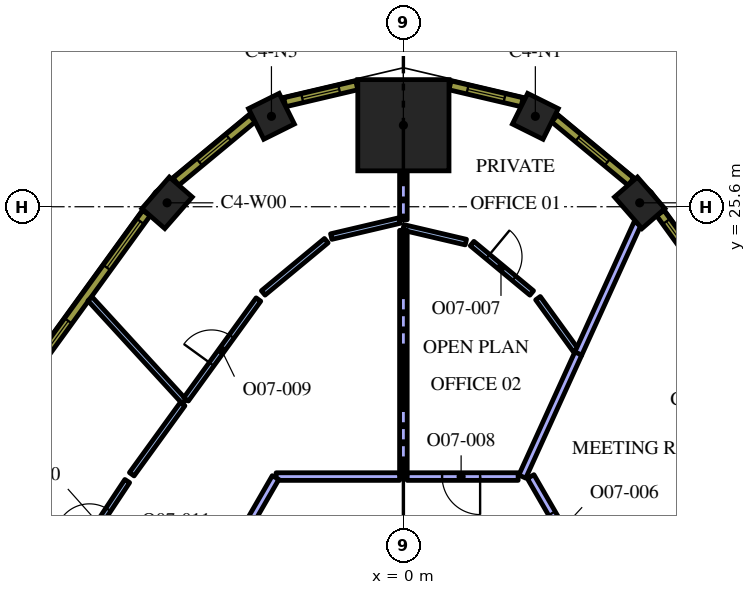
"""IFC4 building model, lengths in metres.
Left out: names, types, materials, properties, quantities, classifications, styles, units other than length and angle.
Written with IfcOpenShell. Run it as: python <this file> out.ifc"""

import sys

from ifc_helpers import new_model, si_unit, direction, frame, frame_2d, origin, origin_2d, place, context, subcontext, project, spatial, rectangle, extrude, element, fill, save


model = new_model("IFC4")
c1 = context("Model", 3, precision=1e-05, world=origin(), true_north=direction((0.0, 1.0)))
c2 = subcontext(c1, "Body", "Model", "MODEL_VIEW")
j1 = project(units=[si_unit("LENGTHUNIT", "METRE"), si_unit("PLANEANGLEUNIT", "RADIAN")], contexts=[c1])
p1 = place(None, origin())
s1 = spatial("IfcSite", under=j1, at=p1, CompositionType="ELEMENT")
p2 = place(p1, origin())
s2 = spatial("IfcBuilding", under=s1, at=p2, CompositionType="ELEMENT")
p3 = place(p2, frame((0.0, 0.0, 222.6)))
s3 = spatial("IfcBuildingStorey", under=s2, at=p3, CompositionType="ELEMENT", Elevation=222.6)
p4 = place(p3, frame((0.0, 27.744, 0.0), z_axis=(0.0, 0.0, 1.0), x_axis=(0.0, 1.0, 0.0)))
e1 = element("IfcColumn", 1, at=p4, inside=s3, PredefinedType="COLUMN", context=c2, shape_type="SweptSolid", body=[
    extrude(rectangle(XDim=2.4, YDim=2.4, at=origin_2d()), origin(), (0.0, 0.0, 1.0), 4.2),
])
p5 = place(p3, frame((6.219, 25.703, 0.0), z_axis=(0.0, 0.0, 1.0), x_axis=(-0.657250291216, 0.753672378886, 0.0)))
e2 = element("IfcColumn", 2, at=p5, inside=s3, PredefinedType="COLUMN", context=c2, shape_type="SweptSolid", body=[
    extrude(rectangle(XDim=1.1, YDim=0.8, at=origin_2d()), origin(), (0.0, 0.0, 1.0), 4.2),
])
for number, where, z_axis, x_axis in (
    (3, (3.472, 27.979, 0.0), (0.0, 0.0, 1.0), (-0.895, 0.445, 0.0)),
    (4, (-3.472, 27.979, 0.0), (0.0, 0.0, 1.0), (-0.895, -0.445, 0.0)),
):
    element("IfcColumn", number, at=place(p3, frame(where, z_axis=z_axis, x_axis=x_axis)), inside=s3, PredefinedType="COLUMN", context=c2, shape_type="SweptSolid", body=[
        extrude(rectangle(XDim=0.9, YDim=0.9, at=origin_2d()), origin(), (0.0, 0.0, 1.0), 4.2),
    ])
p6 = place(p3, frame((-6.219, 25.703, 0.0), z_axis=(0.0, 0.0, 1.0), x_axis=(-0.657250291216, -0.753672378886, 0.0)))
e5 = element("IfcColumn", 5, at=p6, inside=s3, PredefinedType="COLUMN", context=c2, shape_type="SweptSolid", body=[
    extrude(rectangle(XDim=1.1, YDim=0.8, at=origin_2d()), origin(), (0.0, 0.0, 1.0), 4.2),
])
p7 = place(p3, frame((7.011, 15.156, 0.0), z_axis=(0.0, 0.0, 1.0), x_axis=(0.866015917575, 0.500016430238, 0.0)))
e6 = element("IfcWall", 6, at=p7, inside=s3, PredefinedType="PARTITIONING", context=c2, shape_type="SweptSolid", body=[
    extrude(rectangle(XDim=5.607, YDim=0.2, at=frame_2d((2.804, 0.0))), origin(), (0.0, 0.0, 1.0), 3.45),
])
p8 = place(p3, frame((4.599, 21.729, 0.0), z_axis=(0.0, 0.0, 1.0), x_axis=(0.414300595715, 0.91014010811, 0.0)))
e7 = element("IfcWall", 7, at=p8, inside=s3, PredefinedType="PARTITIONING", context=c2, shape_type="SweptSolid", body=[
    extrude(rectangle(XDim=3.77, YDim=0.2, at=frame_2d((1.885, 0.0))), origin(), (0.0, 0.0, 1.0), 3.45),
])
p9 = place(p3, frame((3.129, 18.5, 0.0), z_axis=(0.0, 0.0, 1.0), x_axis=(0.41435618773, 0.910114800281, 0.0)))
e8 = element("IfcWall", 8, at=p9, inside=s3, PredefinedType="PARTITIONING", context=c2, shape_type="SweptSolid", body=[
    extrude(rectangle(XDim=3.557, YDim=0.2, at=frame_2d((1.779, 0.0))), origin(), (0.0, 0.0, 1.0), 3.45),
])
p10 = place(p3, frame((5.007, 15.627, 0.0), z_axis=(0.0, 0.0, 1.0), x_axis=(-0.499962429619, 0.866047093968, 0.0)))
e9 = element("IfcWall", 9, at=p10, inside=s3, PredefinedType="PARTITIONING", context=c2, shape_type="SweptSolid", body=[
    extrude(rectangle(XDim=3.317, YDim=0.2, at=frame_2d((1.659, 0.0))), origin(), (0.0, 0.0, 1.0), 3.45),
])
p11 = place(p10, frame((1.2, 0.0, 0.0)))
e10 = element("IfcOpeningElement", 10, at=p11, cuts=e9, PredefinedType="OPENING", context=c2, shape_type="SweptSolid", body=[
    extrude(rectangle(XDim=1.0, YDim=2.1, at=frame_2d((0.5, 1.05))), frame((0.0, 0.11, 0.0), z_axis=(0.0, -1.0, 0.0), x_axis=(1.0, 0.0, 0.0)), (0.0, 0.0, 1.0), 0.22),
])
p12 = place(p3, frame((4.533, 21.826, 0.0), z_axis=(0.0, 0.0, 1.0), x_axis=(-0.587019669034, 0.809572670096, 0.0)))
e11 = element("IfcWall", 11, at=p12, inside=s3, PredefinedType="PARTITIONING", context=c2, shape_type="SweptSolid", body=[
    extrude(rectangle(XDim=1.689, YDim=0.15, at=frame_2d((0.845, 0.0))), origin(), (0.0, 0.0, 1.0), 3.45),
])
p13 = place(p3, frame((1.808, 24.631, 0.0), z_axis=(0.0, 0.0, 1.0), x_axis=(0.769986239032, -0.638060492195, 0.0)))
e12 = element("IfcWall", 12, at=p13, inside=s3, PredefinedType="PARTITIONING", context=c2, shape_type="SweptSolid", body=[
    extrude(rectangle(XDim=2.038, YDim=0.15, at=frame_2d((1.019, 0.0))), origin(), (0.0, 0.0, 1.0), 3.45),
])
p14 = place(p13, frame((0.538, 0.0, 0.0)))
e13 = element("IfcOpeningElement", 13, at=p14, cuts=e12, PredefinedType="OPENING", context=c2, shape_type="SweptSolid", body=[
    extrude(rectangle(XDim=0.9, YDim=2.1, at=frame_2d((0.45, 1.05))), frame((0.0, 0.085, 0.0), z_axis=(0.0, -1.0, 0.0), x_axis=(1.0, 0.0, 0.0)), (0.0, 0.0, 1.0), 0.17),
])
p15 = place(p3, frame((1.644, 24.669, 0.0), z_axis=(0.0, 0.0, 1.0), x_axis=(-0.973521361509, 0.228596060084, 0.0)))
e14 = element("IfcWall", 14, at=p15, inside=s3, PredefinedType="PARTITIONING", context=c2, shape_type="SweptSolid", body=[
    extrude(rectangle(XDim=1.688, YDim=0.15, at=frame_2d((0.844, 0.0))), origin(), (0.0, 0.0, 1.0), 3.45),
])
p16 = place(p3, frame((0.0, 25.257, 0.0), z_axis=(0.0, 0.0, 1.0), x_axis=(0.0, 1.0, 0.0)))
e15 = element("IfcWall", 15, at=p16, inside=s3, PredefinedType="PARTITIONING", context=c2, shape_type="SweptSolid", body=[
    extrude(rectangle(XDim=1.288, YDim=0.2, at=frame_2d((0.644, 0.0))), origin(), (0.0, 0.0, 1.0), 3.45),
])
p17 = place(p3, frame((0.0, 18.5, 0.0), z_axis=(0.0, 0.0, 1.0), x_axis=(0.0, 1.0, 0.0)))
e16 = element("IfcWall", 16, at=p17, inside=s3, PredefinedType="PARTITIONING", context=c2, shape_type="SweptSolid", body=[
    extrude(rectangle(XDim=6.479, YDim=0.2, at=frame_2d((3.239, 0.0))), origin(), (0.0, 0.0, 1.0), 3.45),
])
p18 = place(p3, frame((3.019, 18.5, 0.0), z_axis=(0.0, 0.0, 1.0), x_axis=(-1.0, 0.0, 0.0)))
e17 = element("IfcWall", 17, at=p18, inside=s3, PredefinedType="PARTITIONING", context=c2, shape_type="SweptSolid", body=[
    extrude(rectangle(XDim=2.919, YDim=0.2, at=frame_2d((1.459, 0.0))), origin(), (0.0, 0.0, 1.0), 3.45),
])
p19 = place(p18, frame((1.0, 0.0, 0.0)))
e18 = element("IfcOpeningElement", 18, at=p19, cuts=e17, PredefinedType="OPENING", context=c2, shape_type="SweptSolid", body=[
    extrude(rectangle(XDim=1.0, YDim=2.1, at=frame_2d((0.5, 1.05))), frame((0.0, 0.11, 0.0), z_axis=(0.0, -1.0, 0.0), x_axis=(1.0, 0.0, 0.0)), (0.0, 0.0, 1.0), 0.22),
])
p20 = place(p3, frame((-5.764, 20.469, 0.0), z_axis=(0.0, 0.0, 1.0), x_axis=(-0.675673477211, 0.737201025632, 0.0)))
e19 = element("IfcWall", 19, at=p20, inside=s3, PredefinedType="PARTITIONING", context=c2, shape_type="SweptSolid", body=[
    extrude(rectangle(XDim=3.674, YDim=0.15, at=frame_2d((1.837, 0.0))), origin(), (0.0, 0.0, 1.0), 3.45),
])
p21 = place(p3, frame((-0.1, 25.237, 0.0), z_axis=(0.0, 0.0, 1.0), x_axis=(-0.973501996937, -0.22867851224, 0.0)))
e20 = element("IfcWall", 20, at=p21, inside=s3, PredefinedType="PARTITIONING", context=c2, shape_type="SweptSolid", body=[
    extrude(rectangle(XDim=1.848, YDim=0.15, at=frame_2d((0.924, 0.0))), origin(), (0.0, 0.0, 1.0), 3.45),
])
p22 = place(p3, frame((-2.029, 24.707, 0.0), z_axis=(0.0, 0.0, 1.0), x_axis=(-0.769991356208, -0.63805431694, 0.0)))
e21 = element("IfcWall", 21, at=p22, inside=s3, PredefinedType="PARTITIONING", context=c2, shape_type="SweptSolid", body=[
    extrude(rectangle(XDim=2.156, YDim=0.15, at=frame_2d((1.078, 0.0))), origin(), (0.0, 0.0, 1.0), 3.45),
])
p23 = place(p3, frame((-5.719, 20.531, 0.0), z_axis=(0.0, 0.0, 1.0), x_axis=(0.586981132734, 0.809600611298, 0.0)))
e22 = element("IfcWall", 22, at=p23, inside=s3, PredefinedType="PARTITIONING", context=c2, shape_type="SweptSolid", body=[
    extrude(rectangle(XDim=3.245, YDim=0.15, at=frame_2d((1.623, 0.0))), origin(), (0.0, 0.0, 1.0), 3.45),
])
p24 = place(p23, frame((1.145, 0.0, 0.0)))
e23 = element("IfcOpeningElement", 23, at=p24, cuts=e22, PredefinedType="OPENING", context=c2, shape_type="SweptSolid", body=[
    extrude(rectangle(XDim=0.9, YDim=2.1, at=frame_2d((0.45, 1.05))), frame((0.0, 0.085, 0.0), z_axis=(0.0, -1.0, 0.0), x_axis=(1.0, 0.0, 0.0)), (0.0, 0.0, 1.0), 0.17),
])
p25 = place(p3, frame((-5.809, 20.407, 0.0), z_axis=(0.0, 0.0, 1.0), x_axis=(-0.587095604593, -0.809517603927, 0.0)))
e24 = element("IfcWall", 24, at=p25, inside=s3, PredefinedType="PARTITIONING", context=c2, shape_type="SweptSolid", body=[
    extrude(rectangle(XDim=2.281, YDim=0.15, at=frame_2d((1.141, 0.0))), origin(), (0.0, 0.0, 1.0), 3.45),
])
p26 = place(p3, frame((-8.744, 16.156, 0.0), z_axis=(0.0, 0.0, 1.0), x_axis=(0.552885218102, 0.833257424572, 0.0)))
e25 = element("IfcWall", 25, at=p26, inside=s3, PredefinedType="PARTITIONING", context=c2, shape_type="SweptSolid", body=[
    extrude(rectangle(XDim=2.672, YDim=0.15, at=frame_2d((1.336, 0.0))), origin(), (0.0, 0.0, 1.0), 3.45),
])
p27 = place(p26, frame((0.872, 0.0, 0.0)))
e26 = element("IfcOpeningElement", 26, at=p27, cuts=e25, PredefinedType="OPENING", context=c2, shape_type="SweptSolid", body=[
    extrude(rectangle(XDim=0.9, YDim=2.1, at=frame_2d((0.45, 1.05))), frame((0.0, 0.085, 0.0), z_axis=(0.0, -1.0, 0.0), x_axis=(1.0, 0.0, 0.0)), (0.0, 0.0, 1.0), 0.17),
])
p28 = place(p3, frame((-8.809, 16.194, 0.0), z_axis=(0.0, 0.0, 1.0), x_axis=(-0.865996792572, 0.500049552799, 0.0)))
e27 = element("IfcWall", 27, at=p28, inside=s3, PredefinedType="PARTITIONING", context=c2, shape_type="SweptSolid", body=[
    extrude(rectangle(XDim=3.532, YDim=0.15, at=frame_2d((1.766, 0.0))), origin(), (0.0, 0.0, 1.0), 3.45),
])
p29 = place(p3, frame((-0.1, 18.5, 0.0), z_axis=(0.0, 0.0, 1.0), x_axis=(-1.0, 0.0, 0.0)))
e28 = element("IfcWall", 28, at=p29, inside=s3, PredefinedType="PARTITIONING", context=c2, shape_type="SweptSolid", body=[
    extrude(rectangle(XDim=3.249, YDim=0.2, at=frame_2d((1.624, 0.0))), origin(), (0.0, 0.0, 1.0), 3.45),
])
p30 = place(p3, frame((-3.364, 18.474, 0.0), z_axis=(0.0, 0.0, 1.0), x_axis=(-0.500007432598, -0.866021112529, 0.0)))
e29 = element("IfcWall", 29, at=p30, inside=s3, PredefinedType="PARTITIONING", context=c2, shape_type="SweptSolid", body=[
    extrude(rectangle(XDim=4.623, YDim=0.2, at=frame_2d((2.311, 0.0))), origin(), (0.0, 0.0, 1.0), 3.45),
])
p31 = place(p30, frame((1.8, 0.0, 0.0)))
e30 = element("IfcOpeningElement", 30, at=p31, cuts=e29, PredefinedType="OPENING", context=c2, shape_type="SweptSolid", body=[
    extrude(rectangle(XDim=1.0, YDim=2.1, at=frame_2d((0.5, 1.05))), frame((0.0, 0.11, 0.0), z_axis=(0.0, -1.0, 0.0), x_axis=(1.0, 0.0, 0.0)), (0.0, 0.0, 1.0), 0.22),
])
p32 = place(p3, frame((9.878, 21.132, 0.0), z_axis=(0.0, 0.0, 1.0), x_axis=(-0.586998456641, 0.80958805074, 0.0)))
e31 = element("IfcWall", 31, at=p32, inside=s3, PredefinedType="SOLIDWALL", context=c2, shape_type="SweptSolid", body=[
    extrude(rectangle(XDim=5.311, YDim=0.24, at=frame_2d((2.655, 0.0))), origin(), (0.0, 0.0, 1.0), 3.95),
])
p33 = place(p32, frame((0.306, 0.0, 0.9)))
e32 = element("IfcOpeningElement", 32, at=p33, cuts=e31, PredefinedType="OPENING", context=c2, shape_type="SweptSolid", body=[
    extrude(rectangle(XDim=1.5, YDim=2.55, at=frame_2d((0.75, 1.275))), frame((0.0, 0.13, 0.0), z_axis=(0.0, -1.0, 0.0), x_axis=(1.0, 0.0, 0.0)), (0.0, 0.0, 1.0), 0.26),
])
p34 = place(p32, frame((3.539, 0.0, 0.9)))
e33 = element("IfcOpeningElement", 33, at=p34, cuts=e31, PredefinedType="OPENING", context=c2, shape_type="SweptSolid", body=[
    extrude(rectangle(XDim=1.5, YDim=2.55, at=frame_2d((0.75, 1.275))), frame((0.0, 0.13, 0.0), z_axis=(0.0, -1.0, 0.0), x_axis=(1.0, 0.0, 0.0)), (0.0, 0.0, 1.0), 0.26),
])
p35 = place(p3, frame((5.987, 26.259, 0.0), z_axis=(0.0, 0.0, 1.0), x_axis=(-0.769990037733, 0.638055908045, 0.0)))
e34 = element("IfcWall", 34, at=p35, inside=s3, PredefinedType="SOLIDWALL", context=c2, shape_type="SweptSolid", body=[
    extrude(rectangle(XDim=2.609, YDim=0.24, at=frame_2d((1.305, 0.0))), origin(), (0.0, 0.0, 1.0), 3.95),
])
p36 = place(p35, frame((0.805, 0.0, 0.9)))
e35 = element("IfcOpeningElement", 35, at=p36, cuts=e34, PredefinedType="OPENING", context=c2, shape_type="SweptSolid", body=[
    extrude(rectangle(XDim=1.0, YDim=2.55, at=frame_2d((0.5, 1.275))), frame((0.0, 0.13, 0.0), z_axis=(0.0, -1.0, 0.0), x_axis=(1.0, 0.0, 0.0)), (0.0, 0.0, 1.0), 0.26),
])
p37 = place(p3, frame((3.123, 28.349, 0.0), z_axis=(0.0, 0.0, 1.0), x_axis=(-0.973515706272, 0.228620142686, 0.0)))
e36 = element("IfcWall", 36, at=p37, inside=s3, PredefinedType="SOLIDWALL", context=c2, shape_type="SweptSolid", body=[
    extrude(rectangle(XDim=1.948, YDim=0.24, at=frame_2d((0.974, 0.0))), origin(), (0.0, 0.0, 1.0), 3.95),
])
p38 = place(p37, frame((0.474, 0.0, 0.9)))
e37 = element("IfcOpeningElement", 37, at=p38, cuts=e36, PredefinedType="OPENING", context=c2, shape_type="SweptSolid", body=[
    extrude(rectangle(XDim=1.0, YDim=2.55, at=frame_2d((0.5, 1.275))), frame((0.0, 0.13, 0.0), z_axis=(0.0, -1.0, 0.0), x_axis=(1.0, 0.0, 0.0)), (0.0, 0.0, 1.0), 0.26),
])
p39 = place(p3, frame((-1.227, 28.794, 0.0), z_axis=(0.0, 0.0, 1.0), x_axis=(-0.973515706272, -0.228620142686, 0.0)))
e38 = element("IfcWall", 38, at=p39, inside=s3, PredefinedType="SOLIDWALL", context=c2, shape_type="SweptSolid", body=[
    extrude(rectangle(XDim=1.948, YDim=0.24, at=frame_2d((0.974, 0.0))), origin(), (0.0, 0.0, 1.0), 3.95),
])
p40 = place(p39, frame((0.474, 0.0, 0.9)))
e39 = element("IfcOpeningElement", 39, at=p40, cuts=e38, PredefinedType="OPENING", context=c2, shape_type="SweptSolid", body=[
    extrude(rectangle(XDim=1.0, YDim=2.55, at=frame_2d((0.5, 1.275))), frame((0.0, 0.13, 0.0), z_axis=(0.0, -1.0, 0.0), x_axis=(1.0, 0.0, 0.0)), (0.0, 0.0, 1.0), 0.26),
])
p41 = place(p3, frame((-3.978, 27.924, 0.0), z_axis=(0.0, 0.0, 1.0), x_axis=(-0.769990037733, -0.638055908045, 0.0)))
e40 = element("IfcWall", 40, at=p41, inside=s3, PredefinedType="SOLIDWALL", context=c2, shape_type="SweptSolid", body=[
    extrude(rectangle(XDim=2.609, YDim=0.24, at=frame_2d((1.305, 0.0))), origin(), (0.0, 0.0, 1.0), 3.95),
])
p42 = place(p41, frame((0.805, 0.0, 0.9)))
e41 = element("IfcOpeningElement", 41, at=p42, cuts=e40, PredefinedType="OPENING", context=c2, shape_type="SweptSolid", body=[
    extrude(rectangle(XDim=1.0, YDim=2.55, at=frame_2d((0.5, 1.275))), frame((0.0, 0.13, 0.0), z_axis=(0.0, -1.0, 0.0), x_axis=(1.0, 0.0, 0.0)), (0.0, 0.0, 1.0), 0.26),
])
p43 = place(p3, frame((-6.761, 25.432, 0.0), z_axis=(0.0, 0.0, 1.0), x_axis=(-0.586998456641, -0.80958805074, 0.0)))
e42 = element("IfcWall", 42, at=p43, inside=s3, PredefinedType="SOLIDWALL", context=c2, shape_type="SweptSolid", body=[
    extrude(rectangle(XDim=5.311, YDim=0.24, at=frame_2d((2.655, 0.0))), origin(), (0.0, 0.0, 1.0), 3.95),
])
p44 = place(p43, frame((0.271, 0.0, 0.9)))
e43 = element("IfcOpeningElement", 43, at=p44, cuts=e42, PredefinedType="OPENING", context=c2, shape_type="SweptSolid", body=[
    extrude(rectangle(XDim=1.5, YDim=2.55, at=frame_2d((0.75, 1.275))), frame((0.0, 0.13, 0.0), z_axis=(0.0, -1.0, 0.0), x_axis=(1.0, 0.0, 0.0)), (0.0, 0.0, 1.0), 0.26),
])
p45 = place(p43, frame((3.504, 0.0, 0.9)))
e44 = element("IfcOpeningElement", 44, at=p45, cuts=e42, PredefinedType="OPENING", context=c2, shape_type="SweptSolid", body=[
    extrude(rectangle(XDim=1.5, YDim=2.55, at=frame_2d((0.75, 1.275))), frame((0.0, 0.13, 0.0), z_axis=(0.0, -1.0, 0.0), x_axis=(1.0, 0.0, 0.0)), (0.0, 0.0, 1.0), 0.26),
])
p46 = place(p11, origin())
e45 = element("IfcDoor", 45, at=p46, inside=s3, OperationType="SINGLE_SWING_RIGHT", PredefinedType="DOOR", context=c2, shape_type="SweptSolid", body=[
    extrude(rectangle(XDim=1.0, YDim=2.1, at=frame_2d((0.5, 1.05))), frame((0.0, 0.025, 0.0), z_axis=(0.0, -1.0, 0.0), x_axis=(1.0, 0.0, 0.0)), (0.0, 0.0, 1.0), 0.05),
])
fill(e10, e45)
p47 = place(p14, origin())
e46 = element("IfcDoor", 46, at=p47, inside=s3, OperationType="SINGLE_SWING_LEFT", PredefinedType="DOOR", context=c2, shape_type="SweptSolid", body=[
    extrude(rectangle(XDim=0.9, YDim=2.1, at=frame_2d((0.45, 1.05))), frame((0.0, 0.025, 0.0), z_axis=(0.0, -1.0, 0.0), x_axis=(1.0, 0.0, 0.0)), (0.0, 0.0, 1.0), 0.05),
])
fill(e13, e46)
p48 = place(p19, origin())
e47 = element("IfcDoor", 47, at=p48, inside=s3, OperationType="SINGLE_SWING_RIGHT", PredefinedType="DOOR", context=c2, shape_type="SweptSolid", body=[
    extrude(rectangle(XDim=1.0, YDim=2.1, at=frame_2d((0.5, 1.05))), frame((0.0, 0.025, 0.0), z_axis=(0.0, -1.0, 0.0), x_axis=(1.0, 0.0, 0.0)), (0.0, 0.0, 1.0), 0.05),
])
fill(e18, e47)
p49 = place(p24, origin())
e48 = element("IfcDoor", 48, at=p49, inside=s3, OperationType="SINGLE_SWING_LEFT", PredefinedType="DOOR", context=c2, shape_type="SweptSolid", body=[
    extrude(rectangle(XDim=0.9, YDim=2.1, at=frame_2d((0.45, 1.05))), frame((0.0, 0.025, 0.0), z_axis=(0.0, -1.0, 0.0), x_axis=(1.0, 0.0, 0.0)), (0.0, 0.0, 1.0), 0.05),
])
fill(e23, e48)
p50 = place(p27, origin())
e49 = element("IfcDoor", 49, at=p50, inside=s3, OperationType="SINGLE_SWING_LEFT", PredefinedType="DOOR", context=c2, shape_type="SweptSolid", body=[
    extrude(rectangle(XDim=0.9, YDim=2.1, at=frame_2d((0.45, 1.05))), frame((0.0, 0.025, 0.0), z_axis=(0.0, -1.0, 0.0), x_axis=(1.0, 0.0, 0.0)), (0.0, 0.0, 1.0), 0.05),
])
fill(e26, e49)
p51 = place(p34, origin())
e50 = element("IfcWindow", 50, at=p51, inside=s3, PartitioningType="SINGLE_PANEL", PredefinedType="WINDOW", context=c2, shape_type="SweptSolid", body=[
    extrude(rectangle(XDim=1.5, YDim=2.55, at=frame_2d((0.75, 1.275))), frame((0.0, 0.04, 0.0), z_axis=(0.0, -1.0, 0.0), x_axis=(1.0, 0.0, 0.0)), (0.0, 0.0, 1.0), 0.06),
])
fill(e33, e50)
p52 = place(p36, origin())
e51 = element("IfcWindow", 51, at=p52, inside=s3, PartitioningType="SINGLE_PANEL", PredefinedType="WINDOW", context=c2, shape_type="SweptSolid", body=[
    extrude(rectangle(XDim=1.0, YDim=2.55, at=frame_2d((0.5, 1.275))), frame((0.0, 0.04, 0.0), z_axis=(0.0, -1.0, 0.0), x_axis=(1.0, 0.0, 0.0)), (0.0, 0.0, 1.0), 0.06),
])
fill(e35, e51)
p53 = place(p38, origin())
e52 = element("IfcWindow", 52, at=p53, inside=s3, PartitioningType="SINGLE_PANEL", PredefinedType="WINDOW", context=c2, shape_type="SweptSolid", body=[
    extrude(rectangle(XDim=1.0, YDim=2.55, at=frame_2d((0.5, 1.275))), frame((0.0, 0.04, 0.0), z_axis=(0.0, -1.0, 0.0), x_axis=(1.0, 0.0, 0.0)), (0.0, 0.0, 1.0), 0.06),
])
fill(e37, e52)
p54 = place(p40, origin())
e53 = element("IfcWindow", 53, at=p54, inside=s3, PartitioningType="SINGLE_PANEL", PredefinedType="WINDOW", context=c2, shape_type="SweptSolid", body=[
    extrude(rectangle(XDim=1.0, YDim=2.55, at=frame_2d((0.5, 1.275))), frame((0.0, 0.04, 0.0), z_axis=(0.0, -1.0, 0.0), x_axis=(1.0, 0.0, 0.0)), (0.0, 0.0, 1.0), 0.06),
])
fill(e39, e53)
p55 = place(p42, origin())
e54 = element("IfcWindow", 54, at=p55, inside=s3, PartitioningType="SINGLE_PANEL", PredefinedType="WINDOW", context=c2, shape_type="SweptSolid", body=[
    extrude(rectangle(XDim=1.0, YDim=2.55, at=frame_2d((0.5, 1.275))), frame((0.0, 0.04, 0.0), z_axis=(0.0, -1.0, 0.0), x_axis=(1.0, 0.0, 0.0)), (0.0, 0.0, 1.0), 0.06),
])
fill(e41, e54)
p56 = place(p44, origin())
e55 = element("IfcWindow", 55, at=p56, inside=s3, PartitioningType="SINGLE_PANEL", PredefinedType="WINDOW", context=c2, shape_type="SweptSolid", body=[
    extrude(rectangle(XDim=1.5, YDim=2.55, at=frame_2d((0.75, 1.275))), frame((0.0, 0.04, 0.0), z_axis=(0.0, -1.0, 0.0), x_axis=(1.0, 0.0, 0.0)), (0.0, 0.0, 1.0), 0.06),
])
fill(e43, e55)
p57 = place(p45, origin())
e56 = element("IfcWindow", 56, at=p57, inside=s3, PartitioningType="SINGLE_PANEL", PredefinedType="WINDOW", context=c2, shape_type="SweptSolid", body=[
    extrude(rectangle(XDim=1.5, YDim=2.55, at=frame_2d((0.75, 1.275))), frame((0.0, 0.04, 0.0), z_axis=(0.0, -1.0, 0.0), x_axis=(1.0, 0.0, 0.0)), (0.0, 0.0, 1.0), 0.06),
])
fill(e44, e56)
save(model, sys.argv[1])
